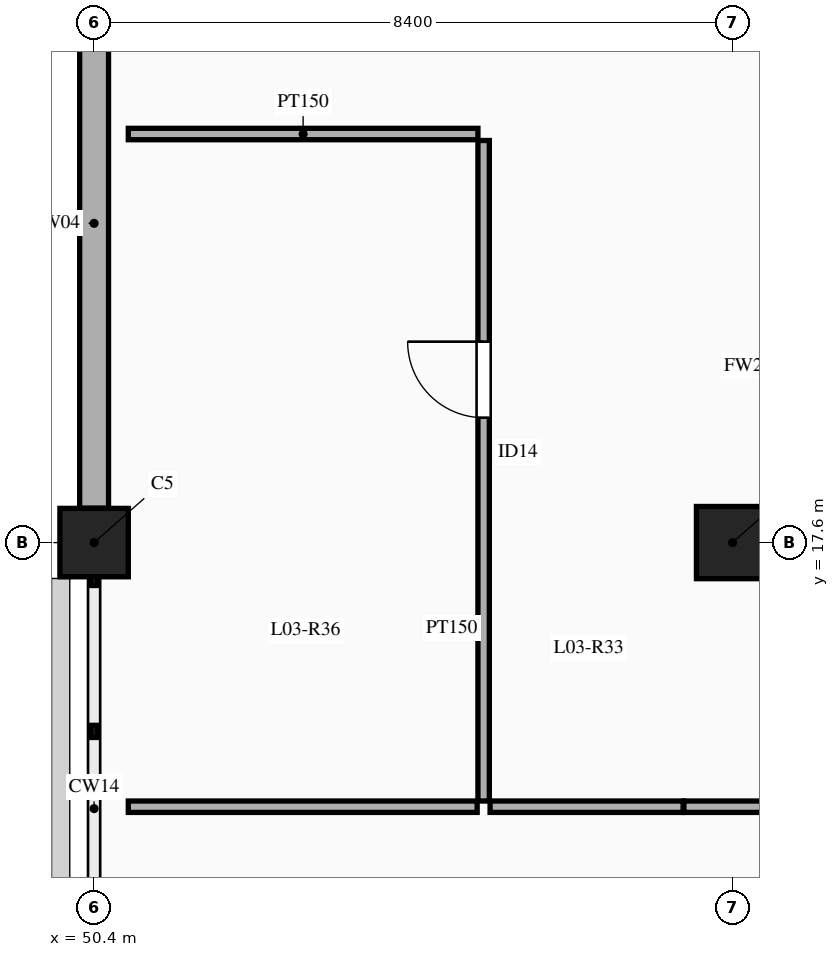
"""IFC4 building model, lengths in metres.
Left out: names, types, materials, properties, quantities, classifications, styles, units other than length and angle.
Written with IfcOpenShell. Run it as: python <this file> out.ifc"""

import sys

from ifc_helpers import new_model, si_unit, direction, frame, frame_2d, origin, origin_2d, place, context, subcontext, project, spatial, rectangle, extrude, element, fill, save


model = new_model("IFC4")
c1 = context("Model", 3, precision=1e-05, world=origin(), true_north=direction((0.0, 1.0)))
c2 = subcontext(c1, "Body", "Model", "MODEL_VIEW")
j1 = project(units=[si_unit("LENGTHUNIT", "METRE"), si_unit("PLANEANGLEUNIT", "RADIAN")], contexts=[c1])
p1 = place(None, origin())
s1 = spatial("IfcSite", under=j1, at=p1, CompositionType="ELEMENT")
p2 = place(p1, origin())
s2 = spatial("IfcBuilding", under=s1, at=p2, CompositionType="ELEMENT")
p3 = place(p2, frame((0.0, 0.0, 15.0)))
s3 = spatial("IfcBuildingStorey", under=s2, at=p3, CompositionType="ELEMENT", Elevation=15.0)
p4 = place(p3, frame((50.4, 17.6, 0.0), z_axis=(0.0, 0.0, 1.0), x_axis=(1.0, 0.0, 0.0)))
e1 = element("IfcColumn", 1, at=p4, inside=s3, PredefinedType="COLUMN", context=c2, shape_type="SweptSolid", body=[
    extrude(rectangle(XDim=0.9, YDim=0.9, at=origin_2d()), origin(), (0.0, 0.0, 1.0), 4.5),
])
p5 = place(p3, frame((58.8, 17.6, 0.0), z_axis=(0.0, 0.0, 1.0), x_axis=(1.0, 0.0, 0.0)))
e2 = element("IfcColumn", 2, at=p5, inside=s3, PredefinedType="COLUMN", context=c2, shape_type="SweptSolid", body=[
    extrude(rectangle(XDim=0.95, YDim=0.95, at=origin_2d()), origin(), (0.0, 0.0, 1.0), 4.5),
])
p6 = place(p3, frame((50.4, 18.052, 0.0), z_axis=(0.0, 0.0, 1.0), x_axis=(0.0, 1.0, 0.0)))
e3 = element("IfcWall", 3, at=p6, inside=s3, PredefinedType="SOLIDWALL", context=c2, shape_type="SweptSolid", body=[
    extrude(rectangle(XDim=7.496, YDim=0.38, at=frame_2d((3.748, 0.0))), origin(), (0.0, 0.0, 1.0), 3.55),
])
p7 = place(p3, frame((50.85, 22.975, 0.0), z_axis=(0.0, 0.0, 1.0), x_axis=(1.0, 0.0, 0.0)))
e4 = element("IfcWall", 4, at=p7, inside=s3, PredefinedType="PARTITIONING", context=c2, shape_type="SweptSolid", body=[
    extrude(rectangle(XDim=4.6, YDim=0.15, at=frame_2d((2.3, 0.0))), origin(), (0.0, 0.0, 1.0), 3.45),
])
p8 = place(p3, frame((55.525, 14.2, 0.0), z_axis=(0.0, 0.0, 1.0), x_axis=(0.0, 1.0, 0.0)))
e5 = element("IfcWall", 5, at=p8, inside=s3, PredefinedType="PARTITIONING", context=c2, shape_type="SweptSolid", body=[
    extrude(rectangle(XDim=8.69, YDim=0.15, at=frame_2d((4.345, 0.0))), origin(), (0.0, 0.0, 1.0), 3.45),
])
p9 = place(p8, frame((5.043, 0.0, 0.0)))
e6 = element("IfcOpeningElement", 6, at=p9, cuts=e5, PredefinedType="OPENING", context=c2, shape_type="SweptSolid", body=[
    extrude(rectangle(XDim=1.0, YDim=2.15, at=frame_2d((0.5, 1.075))), frame((0.0, 0.085, 0.0), z_axis=(0.0, -1.0, 0.0), x_axis=(1.0, 0.0, 0.0)), (0.0, 0.0, 1.0), 0.17),
])
p10 = place(p3, frame((55.61, 14.125, 0.0), z_axis=(0.0, 0.0, 1.0), x_axis=(1.0, 0.0, 0.0)))
e7 = element("IfcWall", 7, at=p10, inside=s3, PredefinedType="PARTITIONING", context=c2, shape_type="SweptSolid", body=[
    extrude(rectangle(XDim=2.54, YDim=0.15, at=frame_2d((1.27, 0.0))), origin(), (0.0, 0.0, 1.0), 3.45),
])
p11 = place(p3, frame((58.16, 14.125, 0.0), z_axis=(0.0, 0.0, 1.0), x_axis=(1.0, 0.0, 0.0)))
e8 = element("IfcWall", 8, at=p11, inside=s3, PredefinedType="PARTITIONING", context=c2, shape_type="SweptSolid", body=[
    extrude(rectangle(XDim=11.44, YDim=0.15, at=frame_2d((5.72, 0.0))), origin(), (0.0, 0.0, 1.0), 3.45),
])
p12 = place(p11, frame((5.22, 0.0, 0.0)))
e9 = element("IfcOpeningElement", 9, at=p12, cuts=e8, PredefinedType="OPENING", context=c2, shape_type="SweptSolid", body=[
    extrude(rectangle(XDim=1.0, YDim=2.15, at=frame_2d((0.5, 1.075))), frame((0.0, 0.085, 0.0), z_axis=(0.0, -1.0, 0.0), x_axis=(1.0, 0.0, 0.0)), (0.0, 0.0, 1.0), 0.17),
])
p13 = place(p3, frame((50.85, 14.125, 0.0), z_axis=(0.0, 0.0, 1.0), x_axis=(1.0, 0.0, 0.0)))
e10 = element("IfcWall", 10, at=p13, inside=s3, PredefinedType="PARTITIONING", context=c2, shape_type="SweptSolid", body=[
    extrude(rectangle(XDim=4.59, YDim=0.15, at=frame_2d((2.295, 0.0))), origin(), (0.0, 0.0, 1.0), 3.45),
])
p14 = place(p9, origin())
e11 = element("IfcDoor", 11, at=p14, inside=s3, OperationType="SINGLE_SWING_RIGHT", PredefinedType="DOOR", context=c2, shape_type="SweptSolid", body=[
    extrude(rectangle(XDim=1.0, YDim=2.15, at=frame_2d((0.5, 1.075))), frame((0.0, 0.025, 0.0), z_axis=(0.0, -1.0, 0.0), x_axis=(1.0, 0.0, 0.0)), (0.0, 0.0, 1.0), 0.05),
])
fill(e6, e11)
save(model, sys.argv[1])
